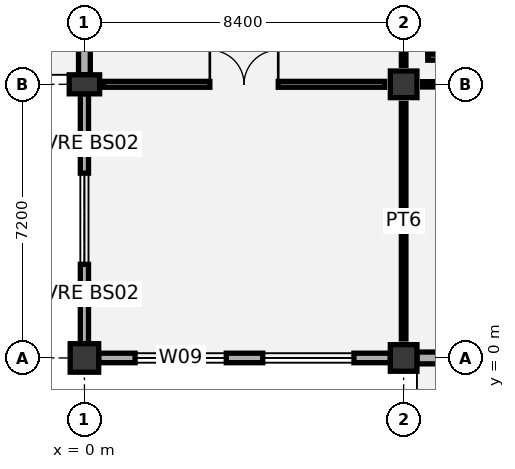
"""IFC4 building model, lengths in metres.
Left out: names, types, materials, properties, quantities, classifications, styles, units other than length and angle.
Written with IfcOpenShell. Run it as: python <this file> out.ifc"""

import sys

from ifc_helpers import new_model, si_unit, direction, frame, frame_2d, origin, origin_with_axes, origin_2d, place, context, subcontext, project, spatial, rectangle, circle, extrude, element, fill, save


model = new_model("IFC4")
c1 = context("Model", 3, precision=1e-05, world=origin(), true_north=direction((0.0, 1.0)))
c2 = subcontext(c1, "Body", "Model", "MODEL_VIEW")
j1 = project(units=[si_unit("LENGTHUNIT", "METRE"), si_unit("PLANEANGLEUNIT", "RADIAN")], contexts=[c1])
p1 = place(None, origin())
s1 = spatial("IfcSite", under=j1, at=p1, CompositionType="ELEMENT")
p2 = place(p1, origin())
s2 = spatial("IfcBuilding", under=s1, at=p2, CompositionType="ELEMENT")
p3 = place(p2, origin())
s3 = spatial("IfcBuildingStorey", under=s2, at=p3, CompositionType="ELEMENT", Elevation=0.0)
p4 = place(p3, origin_with_axes())
e1 = element("IfcColumn", 1, at=p4, inside=s3, PredefinedType="COLUMN", context=c2, shape_type="SweptSolid", body=[
    extrude(circle(Radius=0.375, at=origin_2d()), origin(), (0.0, 0.0, 1.0), 6.0),
])
p5 = place(p3, frame((0.0, 7.2, 0.0), z_axis=(0.0, 0.0, 1.0), x_axis=(0.0, 1.0, 0.0)))
e2 = element("IfcColumn", 2, at=p5, inside=s3, PredefinedType="COLUMN", context=c2, shape_type="SweptSolid", body=[
    extrude(rectangle(XDim=0.5, YDim=0.8, at=origin_2d()), origin(), (0.0, 0.0, 1.0), 6.0),
])
for number, where, z_axis, x_axis in (
    (3, (8.4, 0.0, 0.0), (0.0, 0.0, 1.0), (1.0, 0.0, 0.0)),
    (4, (8.4, 7.2, 0.0), (0.0, 0.0, 1.0), (1.0, 0.0, 0.0)),
):
    element("IfcColumn", number, at=place(p3, frame(where, z_axis=z_axis, x_axis=x_axis)), inside=s3, PredefinedType="COLUMN", context=c2, shape_type="SweptSolid", body=[
        extrude(rectangle(XDim=0.7, YDim=0.7, at=origin_2d()), origin(), (0.0, 0.0, 1.0), 6.0),
    ])
p6 = place(p3, frame((0.375, 0.0, 0.0), z_axis=(0.0, 0.0, 1.0), x_axis=(1.0, 0.0, 0.0)))
e5 = element("IfcWall", 5, at=p6, inside=s3, PredefinedType="SOLIDWALL", context=c2, shape_type="SweptSolid", body=[
    extrude(rectangle(XDim=7.675, YDim=0.25, at=frame_2d((3.837, 0.0))), origin(), (0.0, 0.0, 1.0), 5.12),
])
p7 = place(p6, frame((0.958, 0.0, 0.9)))
e6 = element("IfcOpeningElement", 6, at=p7, cuts=e5, PredefinedType="OPENING", context=c2, shape_type="SweptSolid", body=[
    extrude(rectangle(XDim=2.4, YDim=2.1, at=frame_2d((1.2, 1.05))), frame((0.0, 0.135, 0.0), z_axis=(0.0, -1.0, 0.0), x_axis=(1.0, 0.0, 0.0)), (0.0, 0.0, 1.0), 0.27),
])
p8 = place(p6, frame((4.317, 0.0, 0.9)))
e7 = element("IfcOpeningElement", 7, at=p8, cuts=e5, PredefinedType="OPENING", context=c2, shape_type="SweptSolid", body=[
    extrude(rectangle(XDim=2.4, YDim=2.1, at=frame_2d((1.2, 1.05))), frame((0.0, 0.135, 0.0), z_axis=(0.0, -1.0, 0.0), x_axis=(1.0, 0.0, 0.0)), (0.0, 0.0, 1.0), 0.27),
])
p9 = place(p3, frame((0.0, 0.375, 0.0), z_axis=(0.0, 0.0, 1.0), x_axis=(0.0, 1.0, 0.0)))
e8 = element("IfcWall", 8, at=p9, inside=s3, PredefinedType="SOLIDWALL", context=c2, shape_type="SweptSolid", body=[
    extrude(rectangle(XDim=6.575, YDim=0.215, at=frame_2d((3.288, 0.0))), origin(), (0.0, 0.0, 1.0), 5.12),
])
p10 = place(p9, frame((2.087, 0.0, 0.9)))
e9 = element("IfcOpeningElement", 9, at=p10, cuts=e8, PredefinedType="OPENING", context=c2, shape_type="SweptSolid", body=[
    extrude(rectangle(XDim=2.4, YDim=2.1, at=frame_2d((1.2, 1.05))), frame((0.0, 0.117, 0.0), z_axis=(0.0, -1.0, 0.0), x_axis=(1.0, 0.0, 0.0)), (0.0, 0.0, 1.0), 0.235),
])
p11 = place(p3, frame((0.0, 7.45, 0.0), z_axis=(0.0, 0.0, 1.0), x_axis=(0.0, 1.0, 0.0)))
e10 = element("IfcWall", 10, at=p11, inside=s3, PredefinedType="SOLIDWALL", context=c2, shape_type="SweptSolid", body=[
    extrude(rectangle(XDim=6.7, YDim=0.31, at=frame_2d((3.35, 0.0))), origin(), (0.0, 0.0, 1.0), 5.12),
])
p12 = place(p11, frame((2.775, 0.0, 0.0)))
e11 = element("IfcOpeningElement", 11, at=p12, cuts=e10, PredefinedType="OPENING", context=c2, shape_type="SweptSolid", body=[
    extrude(rectangle(XDim=1.15, YDim=2.15, at=frame_2d((0.575, 1.075))), frame((0.0, 0.165, 0.0), z_axis=(0.0, -1.0, 0.0), x_axis=(1.0, 0.0, 0.0)), (0.0, 0.0, 1.0), 0.33),
])
p13 = place(p3, frame((8.75, 0.0, 0.0), z_axis=(0.0, 0.0, 1.0), x_axis=(1.0, 0.0, 0.0)))
e12 = element("IfcWall", 12, at=p13, inside=s3, PredefinedType="SOLIDWALL", context=c2, shape_type="SweptSolid", body=[
    extrude(rectangle(XDim=7.7, YDim=0.31, at=frame_2d((3.85, 0.0))), origin(), (0.0, 0.0, 1.0), 5.12),
])
p14 = place(p13, frame((3.05, 0.0, 0.0)))
e13 = element("IfcOpeningElement", 13, at=p14, cuts=e12, PredefinedType="OPENING", context=c2, shape_type="SweptSolid", body=[
    extrude(rectangle(XDim=1.6, YDim=2.25, at=frame_2d((0.8, 1.125))), frame((0.0, 0.165, 0.0), z_axis=(0.0, -1.0, 0.0), x_axis=(1.0, 0.0, 0.0)), (0.0, 0.0, 1.0), 0.33),
])
p15 = place(p3, frame((9.035, 7.917, 0.0), z_axis=(0.0, 0.0, 1.0), x_axis=(1.0, 0.0, 0.0)))
e14 = element("IfcWall", 14, at=p15, inside=s3, PredefinedType="PARTITIONING", context=c2, shape_type="SweptSolid", body=[
    extrude(rectangle(XDim=1.43, YDim=0.165, at=frame_2d((0.715, 0.0))), origin(), (0.0, 0.0, 1.0), 5.675),
])
p16 = place(p3, frame((9.117, 8.0, 0.0), z_axis=(0.0, 0.0, 1.0), x_axis=(0.0, 1.0, 0.0)))
e15 = element("IfcWall", 15, at=p16, inside=s3, PredefinedType="PARTITIONING", context=c2, shape_type="SweptSolid", body=[
    extrude(rectangle(XDim=0.8, YDim=0.165, at=frame_2d((0.4, 0.0))), origin(), (0.0, 0.0, 1.0), 5.675),
])
p17 = place(p3, frame((8.4, 0.5, 0.0), z_axis=(0.0, 0.0, 1.0), x_axis=(0.0, 1.0, 0.0)))
e16 = element("IfcWall", 16, at=p17, inside=s3, PredefinedType="PARTITIONING", context=c2, shape_type="SweptSolid", body=[
    extrude(rectangle(XDim=6.2, YDim=0.12, at=frame_2d((3.1, 0.0))), origin(), (0.0, 0.0, 1.0), 5.02),
])
p18 = place(p3, frame((0.5, 7.2, 0.0), z_axis=(0.0, 0.0, 1.0), x_axis=(1.0, 0.0, 0.0)))
e17 = element("IfcWall", 17, at=p18, inside=s3, PredefinedType="PARTITIONING", context=c2, shape_type="SweptSolid", body=[
    extrude(rectangle(XDim=7.4, YDim=0.155, at=frame_2d((3.7, 0.0))), origin(), (0.0, 0.0, 1.0), 4.97),
])
p19 = place(p18, frame((2.8, 0.0, 0.0)))
e18 = element("IfcOpeningElement", 18, at=p19, cuts=e17, PredefinedType="OPENING", context=c2, shape_type="SweptSolid", body=[
    extrude(rectangle(XDim=1.8, YDim=2.25, at=frame_2d((0.9, 1.125))), frame((0.0, 0.087, 0.0), z_axis=(0.0, -1.0, 0.0), x_axis=(1.0, 0.0, 0.0)), (0.0, 0.0, 1.0), 0.175),
])
p20 = place(p3, frame((8.4, 7.7, 0.0), z_axis=(0.0, 0.0, 1.0), x_axis=(0.0, 1.0, 0.0)))
e19 = element("IfcWall", 19, at=p20, inside=s3, PredefinedType="PARTITIONING", context=c2, shape_type="SweptSolid", body=[
    extrude(rectangle(XDim=6.2, YDim=0.12, at=frame_2d((3.1, 0.0))), origin(), (0.0, 0.0, 1.0), 5.48),
])
p21 = place(p3, frame((8.9, 7.2, 0.0), z_axis=(0.0, 0.0, 1.0), x_axis=(1.0, 0.0, 0.0)))
e20 = element("IfcWall", 20, at=p21, inside=s3, PredefinedType="PARTITIONING", context=c2, shape_type="SweptSolid", body=[
    extrude(rectangle(XDim=7.4, YDim=0.14, at=frame_2d((3.7, 0.0))), origin(), (0.0, 0.0, 1.0), 4.97),
])
p22 = place(p21, frame((2.9, 0.0, 0.0)))
e21 = element("IfcOpeningElement", 21, at=p22, cuts=e20, PredefinedType="OPENING", context=c2, shape_type="SweptSolid", body=[
    extrude(rectangle(XDim=1.6, YDim=2.2, at=frame_2d((0.8, 1.1))), frame((0.0, 0.08, 0.0), z_axis=(0.0, -1.0, 0.0), x_axis=(1.0, 0.0, 0.0)), (0.0, 0.0, 1.0), 0.16),
])
p23 = place(p7, origin())
e22 = element("IfcWindow", 22, at=p23, inside=s3, PartitioningType="SINGLE_PANEL", PredefinedType="WINDOW", context=c2, shape_type="SweptSolid", body=[
    extrude(rectangle(XDim=2.4, YDim=2.1, at=frame_2d((1.2, 1.05))), frame((0.0, 0.03, 0.0), z_axis=(0.0, -1.0, 0.0), x_axis=(1.0, 0.0, 0.0)), (0.0, 0.0, 1.0), 0.06),
])
fill(e6, e22)
p24 = place(p8, origin())
e23 = element("IfcWindow", 23, at=p24, inside=s3, PartitioningType="SINGLE_PANEL", PredefinedType="WINDOW", context=c2, shape_type="SweptSolid", body=[
    extrude(rectangle(XDim=2.4, YDim=2.1, at=frame_2d((1.2, 1.05))), frame((0.0, 0.03, 0.0), z_axis=(0.0, -1.0, 0.0), x_axis=(1.0, 0.0, 0.0)), (0.0, 0.0, 1.0), 0.06),
])
fill(e7, e23)
p25 = place(p10, origin())
e24 = element("IfcWindow", 24, at=p25, inside=s3, PartitioningType="SINGLE_PANEL", PredefinedType="WINDOW", context=c2, shape_type="SweptSolid", body=[
    extrude(rectangle(XDim=2.4, YDim=2.1, at=frame_2d((1.2, 1.05))), frame((0.0, 0.03, 0.0), z_axis=(0.0, -1.0, 0.0), x_axis=(1.0, 0.0, 0.0)), (0.0, 0.0, 1.0), 0.06),
])
fill(e9, e24)
p26 = place(p19, origin())
e25 = element("IfcDoor", 25, at=p26, inside=s3, OperationType="DOUBLE_DOOR_SINGLE_SWING", PredefinedType="DOOR", context=c2, shape_type="SweptSolid", body=[
    extrude(rectangle(XDim=1.8, YDim=2.25, at=frame_2d((0.9, 1.125))), frame((0.0, 0.025, 0.0), z_axis=(0.0, -1.0, 0.0), x_axis=(1.0, 0.0, 0.0)), (0.0, 0.0, 1.0), 0.05),
])
fill(e18, e25)
save(model, sys.argv[1])
